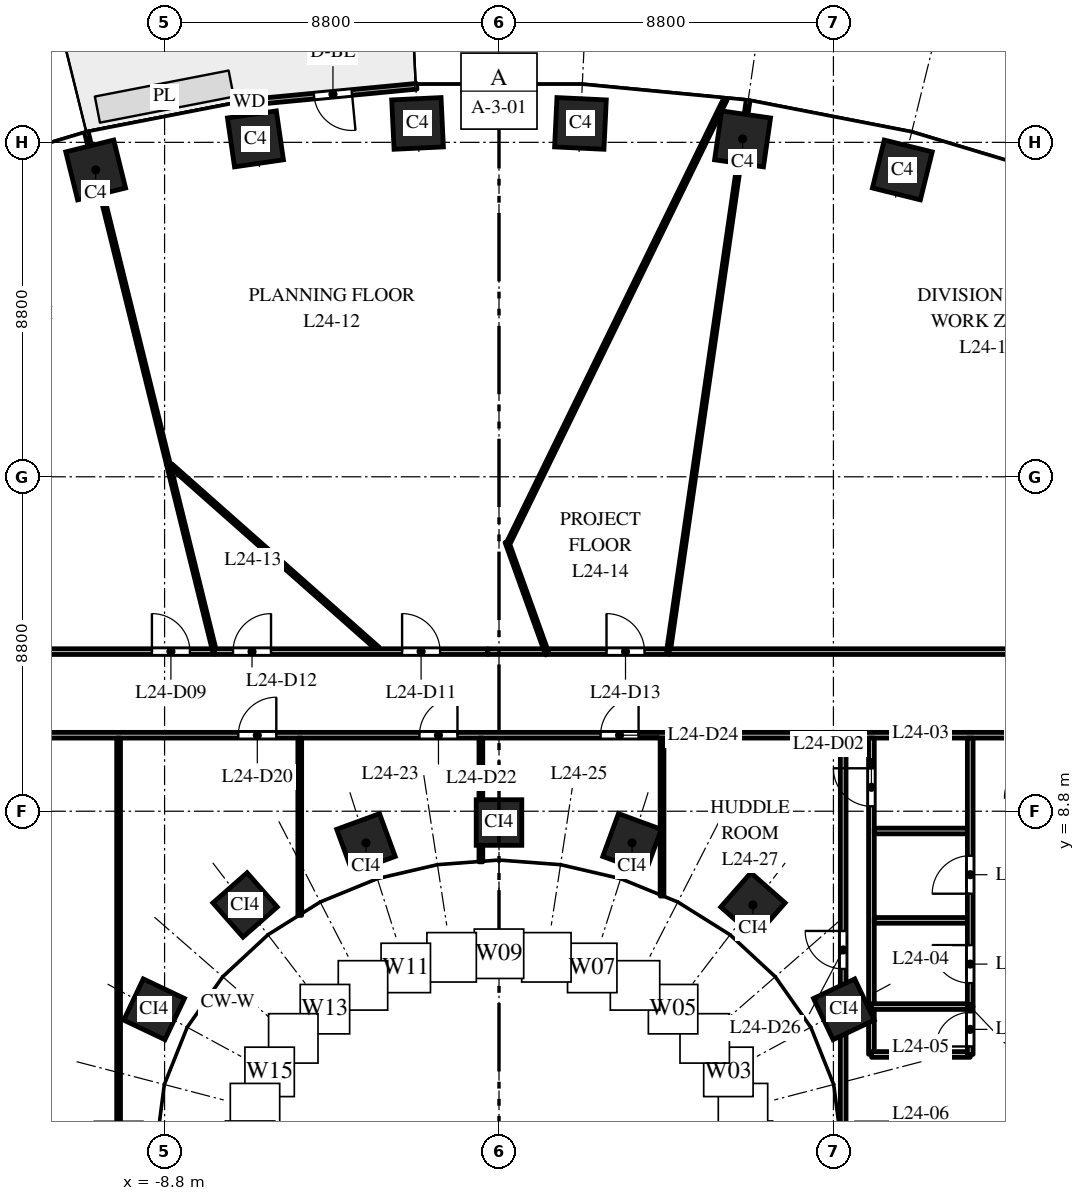
"""IFC4 building model, lengths in metres.
Left out: names, types, materials, properties, quantities, classifications, styles, units other than length and angle.
Written with IfcOpenShell. Run it as: python <this file> out.ifc"""

import sys

from ifc_helpers import new_model, si_unit, direction, frame, frame_2d, origin, origin_2d, place, context, subcontext, project, spatial, rectangle, extrude, element, fill, save


model = new_model("IFC4")
c1 = context("Model", 3, precision=1e-05, world=origin(), true_north=direction((0.0, 1.0)))
c2 = subcontext(c1, "Body", "Model", "MODEL_VIEW")
j1 = project(units=[si_unit("LENGTHUNIT", "METRE"), si_unit("PLANEANGLEUNIT", "RADIAN")], contexts=[c1])
p1 = place(None, origin())
s1 = spatial("IfcSite", under=j1, at=p1, CompositionType="ELEMENT")
p2 = place(p1, origin())
s2 = spatial("IfcBuilding", under=s1, at=p2, CompositionType="ELEMENT")
p3 = place(p2, frame((0.0, 0.0, 108.0)))
s3 = spatial("IfcBuildingStorey", under=s2, at=p3, CompositionType="ELEMENT", Elevation=108.0)
for number, where, z_axis, x_axis in (
    (1, (10.613, 25.674, 0.0), (0.0, 0.0, 1.0), (-0.971, 0.24, 0.0)),
    (2, (6.409, 26.491, 0.0), (0.0, 0.0, 1.0), (-0.99, 0.143, 0.0)),
    (3, (2.143, 26.898, 0.0), (0.0, 0.0, 1.0), (-0.999, 0.048, 0.0)),
    (4, (-2.143, 26.898, 0.0), (0.0, 0.0, 1.0), (-0.999, -0.048, 0.0)),
    (5, (-6.409, 26.491, 0.0), (0.0, 0.0, 1.0), (-0.99, -0.143, 0.0)),
    (6, (-10.613, 25.674, 0.0), (0.0, 0.0, 1.0), (-0.971, -0.24, 0.0)),
):
    element("IfcColumn", number, at=place(p3, frame(where, z_axis=z_axis, x_axis=x_axis)), inside=s3, PredefinedType="COLUMN", context=c2, shape_type="SweptSolid", body=[
        extrude(rectangle(XDim=1.3, YDim=1.3, at=origin_2d()), origin(), (0.0, 0.0, 1.0), 4.0),
    ])
for number, where, z_axis, x_axis in (
    (7, (9.076, 3.588, 0.0), (0.0, 0.0, 1.0), (-0.429, 0.903, 0.0)),
    (8, (6.682, 6.334, 0.0), (0.0, 0.0, 1.0), (-0.751, 0.66, 0.0)),
    (9, (3.501, 7.967, 0.0), (0.0, 0.0, 1.0), (-0.939, 0.344, 0.0)),
    (10, (0.0, 8.503, 0.0), (0.0, 0.0, 1.0), (-1.0, 0.0, 0.0)),
    (11, (-3.501, 7.967, 0.0), (0.0, 0.0, 1.0), (-0.939, -0.344, 0.0)),
    (12, (-6.682, 6.334, 0.0), (0.0, 0.0, 1.0), (-0.751, -0.66, 0.0)),
    (13, (-9.076, 3.588, 0.0), (0.0, 0.0, 1.0), (-0.429, -0.903, 0.0)),
):
    element("IfcColumn", number, at=place(p3, frame(where, z_axis=z_axis, x_axis=x_axis)), inside=s3, PredefinedType="COLUMN", context=c2, shape_type="SweptSolid", body=[
        extrude(rectangle(XDim=1.2, YDim=1.2, at=origin_2d()), origin(), (0.0, 0.0, 1.0), 4.0),
    ])
p4 = place(p3, frame((-2.166, 27.875, 0.0), z_axis=(0.0, 0.0, 1.0), x_axis=(-0.995473879823, -0.095035543824, 0.0)))
e14 = element("IfcWall", 14, at=p4, inside=s3, PredefinedType="STANDARD", context=c2, shape_type="SweptSolid", body=[
    extrude(rectangle(XDim=4.426, YDim=0.15, at=frame_2d((2.213, 0.0))), origin(), (0.0, 0.0, 1.0), 3.7),
])
p5 = place(p4, frame((1.713, 0.0, 0.0)))
e15 = element("IfcOpeningElement", 15, at=p5, cuts=e14, PredefinedType="OPENING", context=c2, shape_type="SweptSolid", body=[
    extrude(rectangle(XDim=1.0, YDim=2.4, at=frame_2d((0.5, 1.2))), frame((0.0, 0.085, 0.0), z_axis=(0.0, -1.0, 0.0), x_axis=(1.0, 0.0, 0.0)), (0.0, 0.0, 1.0), 0.17),
])
p6 = place(p3, frame((-16.5, 13.0, 0.0), z_axis=(0.0, 0.0, 1.0), x_axis=(1.0, 0.0, 0.0)))
e16 = element("IfcWall", 16, at=p6, inside=s3, PredefinedType="PARTITIONING", context=c2, shape_type="SweptSolid", body=[
    extrude(rectangle(XDim=9.001, YDim=0.15, at=frame_2d((4.5, 0.0))), origin(), (0.0, 0.0, 1.0), 2.85),
])
p7 = place(p6, frame((7.367, 0.0, 0.0)))
e17 = element("IfcOpeningElement", 17, at=p7, cuts=e16, PredefinedType="OPENING", context=c2, shape_type="SweptSolid", body=[
    extrude(rectangle(XDim=1.0, YDim=2.1, at=frame_2d((0.5, 1.05))), frame((0.0, 0.085, 0.0), z_axis=(0.0, -1.0, 0.0), x_axis=(1.0, 0.0, 0.0)), (0.0, 0.0, 1.0), 0.17),
])
p8 = place(p3, frame((-14.3, 10.8, 0.0), z_axis=(0.0, 0.0, 1.0), x_axis=(1.0, 0.0, 0.0)))
e18 = element("IfcWall", 18, at=p8, inside=s3, PredefinedType="PARTITIONING", context=c2, shape_type="SweptSolid", body=[
    extrude(rectangle(XDim=28.6, YDim=0.15, at=frame_2d((14.3, 0.0))), origin(), (0.0, 0.0, 1.0), 2.85),
])
p9 = place(p8, frame((7.44, 0.0, 0.0)))
e19 = element("IfcOpeningElement", 19, at=p9, cuts=e18, PredefinedType="OPENING", context=c2, shape_type="SweptSolid", body=[
    extrude(rectangle(XDim=1.0, YDim=2.1, at=frame_2d((0.5, 1.05))), frame((0.0, 0.085, 0.0), z_axis=(0.0, -1.0, 0.0), x_axis=(1.0, 0.0, 0.0)), (0.0, 0.0, 1.0), 0.17),
])
p10 = place(p8, frame((12.207, 0.0, 0.0)))
e20 = element("IfcOpeningElement", 20, at=p10, cuts=e18, PredefinedType="OPENING", context=c2, shape_type="SweptSolid", body=[
    extrude(rectangle(XDim=1.0, YDim=2.1, at=frame_2d((0.5, 1.05))), frame((0.0, 0.085, 0.0), z_axis=(0.0, -1.0, 0.0), x_axis=(1.0, 0.0, 0.0)), (0.0, 0.0, 1.0), 0.17),
])
p11 = place(p8, frame((16.973, 0.0, 0.0)))
e21 = element("IfcOpeningElement", 21, at=p11, cuts=e18, PredefinedType="OPENING", context=c2, shape_type="SweptSolid", body=[
    extrude(rectangle(XDim=1.0, YDim=2.1, at=frame_2d((0.5, 1.05))), frame((0.0, 0.085, 0.0), z_axis=(0.0, -1.0, 0.0), x_axis=(1.0, 0.0, 0.0)), (0.0, 0.0, 1.0), 0.17),
])
p12 = place(p3, frame((-10.853, 26.646, 0.0), z_axis=(0.0, 0.0, 1.0), x_axis=(0.239763745499, -0.97083126564, 0.0)))
e22 = element("IfcWall", 22, at=p12, inside=s3, PredefinedType="PARTITIONING", context=c2, shape_type="SweptSolid", body=[
    extrude(rectangle(XDim=14.056, YDim=0.1, at=frame_2d((7.028, 0.0))), origin(), (0.0, 0.0, 1.0), 2.85),
])
p13 = place(p3, frame((-10.01, -10.725, 0.0), z_axis=(0.0, 0.0, 1.0), x_axis=(0.0, 1.0, 0.0)))
e23 = element("IfcWall", 23, at=p13, inside=s3, PredefinedType="PARTITIONING", context=c2, shape_type="SweptSolid", body=[
    extrude(rectangle(XDim=21.45, YDim=0.1, at=frame_2d((10.725, 0.0))), origin(), (0.0, 0.0, 1.0), 2.75),
])
p14 = place(p3, frame((-8.642, 17.903, 0.0), z_axis=(0.0, 0.0, 1.0), x_axis=(0.749027274438, -0.662539162728, 0.0)))
e24 = element("IfcWall", 24, at=p14, inside=s3, PredefinedType="PARTITIONING", context=c2, shape_type="SweptSolid", body=[
    extrude(rectangle(XDim=7.283, YDim=0.1, at=frame_2d((3.642, 0.0))), origin(), (0.0, 0.0, 1.0), 2.85),
])
p15 = place(p3, frame((-7.483, 13.0, 0.0), z_axis=(0.0, 0.0, 1.0), x_axis=(1.0, 0.0, 0.0)))
e25 = element("IfcWall", 25, at=p15, inside=s3, PredefinedType="PARTITIONING", context=c2, shape_type="SweptSolid", body=[
    extrude(rectangle(XDim=7.184, YDim=0.15, at=frame_2d((3.592, 0.0))), origin(), (0.0, 0.0, 1.0), 2.85),
])
p16 = place(p15, frame((4.933, 0.0, 0.0)))
e26 = element("IfcOpeningElement", 26, at=p16, cuts=e25, PredefinedType="OPENING", context=c2, shape_type="SweptSolid", body=[
    extrude(rectangle(XDim=1.0, YDim=2.1, at=frame_2d((0.5, 1.05))), frame((0.0, 0.085, 0.0), z_axis=(0.0, -1.0, 0.0), x_axis=(1.0, 0.0, 0.0)), (0.0, 0.0, 1.0), 0.17),
])
p17 = place(p15, frame((0.484, 0.0, 0.0)))
e27 = element("IfcOpeningElement", 27, at=p17, cuts=e25, PredefinedType="OPENING", context=c2, shape_type="SweptSolid", body=[
    extrude(rectangle(XDim=1.0, YDim=2.1, at=frame_2d((0.5, 1.05))), frame((0.0, 0.085, 0.0), z_axis=(0.0, -1.0, 0.0), x_axis=(1.0, 0.0, 0.0)), (0.0, 0.0, 1.0), 0.17),
])
p18 = place(p3, frame((-5.243, 6.059, 0.0), z_axis=(0.0, 0.0, 1.0), x_axis=(0.0, 1.0, 0.0)))
e28 = element("IfcWall", 28, at=p18, inside=s3, PredefinedType="PARTITIONING", context=c2, shape_type="SweptSolid", body=[
    extrude(rectangle(XDim=4.666, YDim=0.1, at=frame_2d((2.333, 0.0))), origin(), (0.0, 0.0, 1.0), 2.9),
])
p19 = place(p3, frame((-0.477, 7.468, 0.0), z_axis=(0.0, 0.0, 1.0), x_axis=(0.0, 1.0, 0.0)))
e29 = element("IfcWall", 29, at=p19, inside=s3, PredefinedType="PARTITIONING", context=c2, shape_type="SweptSolid", body=[
    extrude(rectangle(XDim=3.257, YDim=0.1, at=frame_2d((1.628, 0.0))), origin(), (0.0, 0.0, 1.0), 2.9),
])
p20 = place(p3, frame((-0.295, 13.0, 0.0), z_axis=(0.0, 0.0, 1.0), x_axis=(1.0, 0.0, 0.0)))
e30 = element("IfcWall", 30, at=p20, inside=s3, PredefinedType="PARTITIONING", context=c2, shape_type="SweptSolid", body=[
    extrude(rectangle(XDim=1.529, YDim=0.15, at=frame_2d((0.764, 0.0))), origin(), (0.0, 0.0, 1.0), 3.7),
])
p21 = place(p3, frame((0.207, 15.89, 0.0), z_axis=(0.0, 0.0, 1.0), x_axis=(0.338439213009, -0.94098825662, 0.0)))
e31 = element("IfcWall", 31, at=p21, inside=s3, PredefinedType="PARTITIONING", context=c2, shape_type="SweptSolid", body=[
    extrude(rectangle(XDim=3.147, YDim=0.1, at=frame_2d((1.573, 0.0))), origin(), (0.0, 0.0, 1.0), 3.7),
])
p22 = place(p3, frame((0.262, 15.887, 0.0), z_axis=(0.0, 0.0, 1.0), x_axis=(0.439206418019, 0.898386176636, 0.0)))
e32 = element("IfcWall", 32, at=p22, inside=s3, PredefinedType="PARTITIONING", context=c2, shape_type="SweptSolid", body=[
    extrude(rectangle(XDim=12.969, YDim=0.1, at=frame_2d((6.484, 0.0))), origin(), (0.0, 0.0, 1.0), 2.9),
])
p23 = place(p3, frame((1.299, 13.0, 0.0), z_axis=(0.0, 0.0, 1.0), x_axis=(1.0, 0.0, 0.0)))
e33 = element("IfcWall", 33, at=p23, inside=s3, PredefinedType="PARTITIONING", context=c2, shape_type="SweptSolid", body=[
    extrude(rectangle(XDim=3.16, YDim=0.15, at=frame_2d((1.58, 0.0))), origin(), (0.0, 0.0, 1.0), 2.85),
])
p24 = place(p23, frame((1.53, 0.0, 0.0)))
e34 = element("IfcOpeningElement", 34, at=p24, cuts=e33, PredefinedType="OPENING", context=c2, shape_type="SweptSolid", body=[
    extrude(rectangle(XDim=1.0, YDim=2.1, at=frame_2d((0.5, 1.05))), frame((0.0, 0.085, 0.0), z_axis=(0.0, -1.0, 0.0), x_axis=(1.0, 0.0, 0.0)), (0.0, 0.0, 1.0), 0.17),
])
p25 = place(p3, frame((4.29, 6.568, 0.0), z_axis=(0.0, 0.0, 1.0), x_axis=(0.0, 1.0, 0.0)))
e35 = element("IfcWall", 35, at=p25, inside=s3, PredefinedType="PARTITIONING", context=c2, shape_type="SweptSolid", body=[
    extrude(rectangle(XDim=4.157, YDim=0.1, at=frame_2d((2.079, 0.0))), origin(), (0.0, 0.0, 1.0), 2.9),
])
p26 = place(p3, frame((4.459, 13.004, 0.0), z_axis=(0.0, 0.0, 1.0), x_axis=(0.143087196312, 0.98971008596, 0.0)))
e36 = element("IfcWall", 36, at=p26, inside=s3, PredefinedType="PARTITIONING", context=c2, shape_type="SweptSolid", body=[
    extrude(rectangle(XDim=14.628, YDim=0.1, at=frame_2d((7.314, 0.0))), origin(), (0.0, 0.0, 1.0), 2.85),
])
p27 = place(p3, frame((4.479, 13.0, 0.0), z_axis=(0.0, 0.0, 1.0), x_axis=(1.0, 0.0, 0.0)))
e37 = element("IfcWall", 37, at=p27, inside=s3, PredefinedType="PARTITIONING", context=c2, shape_type="SweptSolid", body=[
    extrude(rectangle(XDim=12.021, YDim=0.15, at=frame_2d((6.01, 0.0))), origin(), (0.0, 0.0, 1.0), 2.85),
])
p28 = place(p27, frame((10.371, 0.0, 0.0)))
e38 = element("IfcOpeningElement", 38, at=p28, cuts=e37, PredefinedType="OPENING", context=c2, shape_type="SweptSolid", body=[
    extrude(rectangle(XDim=1.0, YDim=2.1, at=frame_2d((0.5, 1.05))), frame((0.0, 0.085, 0.0), z_axis=(0.0, -1.0, 0.0), x_axis=(1.0, 0.0, 0.0)), (0.0, 0.0, 1.0), 0.17),
])
p29 = place(p3, frame((9.057, 0.045, 0.0), z_axis=(0.0, 0.0, 1.0), x_axis=(0.0, 1.0, 0.0)))
e39 = element("IfcWall", 39, at=p29, inside=s3, PredefinedType="PARTITIONING", context=c2, shape_type="SweptSolid", body=[
    extrude(rectangle(XDim=10.68, YDim=0.15, at=frame_2d((5.34, 0.0))), origin(), (0.0, 0.0, 1.0), 2.75),
])
p30 = place(p29, frame((4.605, 0.0, 0.0)))
e40 = element("IfcOpeningElement", 40, at=p30, cuts=e39, PredefinedType="OPENING", context=c2, shape_type="SweptSolid", body=[
    extrude(rectangle(XDim=1.0, YDim=2.1, at=frame_2d((0.5, 1.05))), frame((0.0, 0.085, 0.0), z_axis=(0.0, -1.0, 0.0), x_axis=(1.0, 0.0, 0.0)), (0.0, 0.0, 1.0), 0.17),
])
p31 = place(p3, frame((9.8, 2.404, 0.0), z_axis=(0.0, 0.0, 1.0), x_axis=(0.0, 1.0, 0.0)))
e41 = element("IfcWall", 41, at=p31, inside=s3, PredefinedType="PARTITIONING", context=c2, shape_type="SweptSolid", body=[
    extrude(rectangle(XDim=1.256, YDim=0.15, at=frame_2d((0.628, 0.0))), origin(), (0.0, 0.0, 1.0), 3.7),
])
p32 = place(p3, frame((9.8, 3.66, 0.0), z_axis=(0.0, 0.0, 1.0), x_axis=(0.0, 1.0, 0.0)))
e42 = element("IfcWall", 42, at=p32, inside=s3, PredefinedType="PARTITIONING", context=c2, shape_type="SweptSolid", body=[
    extrude(rectangle(XDim=7.065, YDim=0.15, at=frame_2d((3.533, 0.0))), origin(), (0.0, 0.0, 1.0), 2.75),
])
p33 = place(p32, frame((5.27, 0.0, 0.0)))
e43 = element("IfcOpeningElement", 43, at=p33, cuts=e42, PredefinedType="OPENING", context=c2, shape_type="SweptSolid", body=[
    extrude(rectangle(XDim=1.0, YDim=2.1, at=frame_2d((0.5, 1.05))), frame((0.0, 0.085, 0.0), z_axis=(0.0, -1.0, 0.0), x_axis=(1.0, 0.0, 0.0)), (0.0, 0.0, 1.0), 0.17),
])
p34 = place(p3, frame((9.8, 3.66, 0.0), z_axis=(0.0, 0.0, 1.0), x_axis=(1.0, 0.0, 0.0)))
e44 = element("IfcWall", 44, at=p34, inside=s3, PredefinedType="PARTITIONING", context=c2, shape_type="SweptSolid", body=[
    extrude(rectangle(XDim=2.6, YDim=0.15, at=frame_2d((1.3, 0.0))), origin(), (0.0, 0.0, 1.0), 3.7),
])
p35 = place(p3, frame((9.875, 5.928, 0.0), z_axis=(0.0, 0.0, 1.0), x_axis=(1.0, 0.0, 0.0)))
e45 = element("IfcWall", 45, at=p35, inside=s3, PredefinedType="PARTITIONING", context=c2, shape_type="SweptSolid", body=[
    extrude(rectangle(XDim=2.45, YDim=0.15, at=frame_2d((1.225, 0.0))), origin(), (0.0, 0.0, 1.0), 2.75),
])
p36 = place(p3, frame((9.875, 8.28, 0.0), z_axis=(0.0, 0.0, 1.0), x_axis=(1.0, 0.0, 0.0)))
e46 = element("IfcWall", 46, at=p36, inside=s3, PredefinedType="PARTITIONING", context=c2, shape_type="SweptSolid", body=[
    extrude(rectangle(XDim=2.45, YDim=0.15, at=frame_2d((1.225, 0.0))), origin(), (0.0, 0.0, 1.0), 3.7),
])
p37 = place(p3, frame((9.804, 2.4, 0.0), z_axis=(0.0, 0.0, 1.0), x_axis=(1.0, 0.0, 0.0)))
e47 = element("IfcWall", 47, at=p37, inside=s3, PredefinedType="PARTITIONING", context=c2, shape_type="SweptSolid", body=[
    extrude(rectangle(XDim=2.596, YDim=0.15, at=frame_2d((1.298, 0.0))), origin(), (0.0, 0.0, 1.0), 3.7),
])
p38 = place(p3, frame((12.4, 2.4, 0.0), z_axis=(0.0, 0.0, 1.0), x_axis=(0.0, 1.0, 0.0)))
e48 = element("IfcWall", 48, at=p38, inside=s3, PredefinedType="PARTITIONING", context=c2, shape_type="SweptSolid", body=[
    extrude(rectangle(XDim=1.26, YDim=0.15, at=frame_2d((0.63, 0.0))), origin(), (0.0, 0.0, 1.0), 3.7),
])
p39 = place(p38, frame((0.21, 0.0, 0.0)))
e49 = element("IfcOpeningElement", 49, at=p39, cuts=e48, PredefinedType="OPENING", context=c2, shape_type="SweptSolid", body=[
    extrude(rectangle(XDim=0.9, YDim=2.1, at=frame_2d((0.45, 1.05))), frame((0.0, 0.085, 0.0), z_axis=(0.0, -1.0, 0.0), x_axis=(1.0, 0.0, 0.0)), (0.0, 0.0, 1.0), 0.17),
])
p40 = place(p3, frame((12.4, 3.66, 0.0), z_axis=(0.0, 0.0, 1.0), x_axis=(0.0, 1.0, 0.0)))
e50 = element("IfcWall", 50, at=p40, inside=s3, PredefinedType="PARTITIONING", context=c2, shape_type="SweptSolid", body=[
    extrude(rectangle(XDim=7.065, YDim=0.15, at=frame_2d((3.533, 0.0))), origin(), (0.0, 0.0, 1.0), 2.75),
])
p41 = place(p40, frame((2.97, 0.0, 0.0)))
e51 = element("IfcOpeningElement", 51, at=p41, cuts=e50, PredefinedType="OPENING", context=c2, shape_type="SweptSolid", body=[
    extrude(rectangle(XDim=1.0, YDim=2.1, at=frame_2d((0.5, 1.05))), frame((0.0, 0.085, 0.0), z_axis=(0.0, -1.0, 0.0), x_axis=(1.0, 0.0, 0.0)), (0.0, 0.0, 1.0), 0.17),
])
p42 = place(p40, frame((0.618, 0.0, 0.0)))
e52 = element("IfcOpeningElement", 52, at=p42, cuts=e50, PredefinedType="OPENING", context=c2, shape_type="SweptSolid", body=[
    extrude(rectangle(XDim=1.0, YDim=2.1, at=frame_2d((0.5, 1.05))), frame((0.0, 0.085, 0.0), z_axis=(0.0, -1.0, 0.0), x_axis=(1.0, 0.0, 0.0)), (0.0, 0.0, 1.0), 0.17),
])
p43 = place(p5, origin())
e53 = element("IfcDoor", 53, at=p43, inside=s3, OperationType="SINGLE_SWING_LEFT", PredefinedType="DOOR", context=c2, shape_type="SweptSolid", body=[
    extrude(rectangle(XDim=1.0, YDim=2.4, at=frame_2d((0.5, 1.2))), frame((0.0, 0.025, 0.0), z_axis=(0.0, -1.0, 0.0), x_axis=(1.0, 0.0, 0.0)), (0.0, 0.0, 1.0), 0.05),
])
fill(e15, e53)
p44 = place(p33, origin())
e54 = element("IfcDoor", 54, at=p44, inside=s3, OperationType="SINGLE_SWING_RIGHT", PredefinedType="DOOR", context=c2, shape_type="SweptSolid", body=[
    extrude(rectangle(XDim=1.0, YDim=2.1, at=frame_2d((0.5, 1.05))), frame((0.0, 0.025, 0.0), z_axis=(0.0, -1.0, 0.0), x_axis=(1.0, 0.0, 0.0)), (0.0, 0.0, 1.0), 0.05),
])
fill(e43, e54)
p45 = place(p41, origin())
e55 = element("IfcDoor", 55, at=p45, inside=s3, OperationType="SINGLE_SWING_LEFT", PredefinedType="DOOR", context=c2, shape_type="SweptSolid", body=[
    extrude(rectangle(XDim=1.0, YDim=2.1, at=frame_2d((0.5, 1.05))), frame((0.0, 0.025, 0.0), z_axis=(0.0, -1.0, 0.0), x_axis=(1.0, 0.0, 0.0)), (0.0, 0.0, 1.0), 0.05),
])
fill(e51, e55)
p46 = place(p42, origin())
e56 = element("IfcDoor", 56, at=p46, inside=s3, OperationType="SINGLE_SWING_RIGHT", PredefinedType="DOOR", context=c2, shape_type="SweptSolid", body=[
    extrude(rectangle(XDim=1.0, YDim=2.1, at=frame_2d((0.5, 1.05))), frame((0.0, 0.025, 0.0), z_axis=(0.0, -1.0, 0.0), x_axis=(1.0, 0.0, 0.0)), (0.0, 0.0, 1.0), 0.05),
])
fill(e52, e56)
p47 = place(p39, origin())
e57 = element("IfcDoor", 57, at=p47, inside=s3, OperationType="SINGLE_SWING_LEFT", PredefinedType="DOOR", context=c2, shape_type="SweptSolid", body=[
    extrude(rectangle(XDim=0.9, YDim=2.1, at=frame_2d((0.45, 1.05))), frame((0.0, 0.025, 0.0), z_axis=(0.0, -1.0, 0.0), x_axis=(1.0, 0.0, 0.0)), (0.0, 0.0, 1.0), 0.05),
])
fill(e49, e57)
p48 = place(p7, origin())
e58 = element("IfcDoor", 58, at=p48, inside=s3, OperationType="SINGLE_SWING_LEFT", PredefinedType="DOOR", context=c2, shape_type="SweptSolid", body=[
    extrude(rectangle(XDim=1.0, YDim=2.1, at=frame_2d((0.5, 1.05))), frame((0.0, 0.025, 0.0), z_axis=(0.0, -1.0, 0.0), x_axis=(1.0, 0.0, 0.0)), (0.0, 0.0, 1.0), 0.05),
])
fill(e17, e58)
p49 = place(p16, origin())
e59 = element("IfcDoor", 59, at=p49, inside=s3, OperationType="SINGLE_SWING_LEFT", PredefinedType="DOOR", context=c2, shape_type="SweptSolid", body=[
    extrude(rectangle(XDim=1.0, YDim=2.1, at=frame_2d((0.5, 1.05))), frame((0.0, 0.025, 0.0), z_axis=(0.0, -1.0, 0.0), x_axis=(1.0, 0.0, 0.0)), (0.0, 0.0, 1.0), 0.05),
])
fill(e26, e59)
p50 = place(p17, origin())
e60 = element("IfcDoor", 60, at=p50, inside=s3, OperationType="SINGLE_SWING_RIGHT", PredefinedType="DOOR", context=c2, shape_type="SweptSolid", body=[
    extrude(rectangle(XDim=1.0, YDim=2.1, at=frame_2d((0.5, 1.05))), frame((0.0, 0.025, 0.0), z_axis=(0.0, -1.0, 0.0), x_axis=(1.0, 0.0, 0.0)), (0.0, 0.0, 1.0), 0.05),
])
fill(e27, e60)
p51 = place(p24, origin())
e61 = element("IfcDoor", 61, at=p51, inside=s3, OperationType="SINGLE_SWING_LEFT", PredefinedType="DOOR", context=c2, shape_type="SweptSolid", body=[
    extrude(rectangle(XDim=1.0, YDim=2.1, at=frame_2d((0.5, 1.05))), frame((0.0, 0.025, 0.0), z_axis=(0.0, -1.0, 0.0), x_axis=(1.0, 0.0, 0.0)), (0.0, 0.0, 1.0), 0.05),
])
fill(e34, e61)
p52 = place(p9, origin())
e62 = element("IfcDoor", 62, at=p52, inside=s3, OperationType="SINGLE_SWING_RIGHT", PredefinedType="DOOR", context=c2, shape_type="SweptSolid", body=[
    extrude(rectangle(XDim=1.0, YDim=2.1, at=frame_2d((0.5, 1.05))), frame((0.0, 0.025, 0.0), z_axis=(0.0, -1.0, 0.0), x_axis=(1.0, 0.0, 0.0)), (0.0, 0.0, 1.0), 0.05),
])
fill(e19, e62)
p53 = place(p10, origin())
e63 = element("IfcDoor", 63, at=p53, inside=s3, OperationType="SINGLE_SWING_RIGHT", PredefinedType="DOOR", context=c2, shape_type="SweptSolid", body=[
    extrude(rectangle(XDim=1.0, YDim=2.1, at=frame_2d((0.5, 1.05))), frame((0.0, 0.025, 0.0), z_axis=(0.0, -1.0, 0.0), x_axis=(1.0, 0.0, 0.0)), (0.0, 0.0, 1.0), 0.05),
])
fill(e20, e63)
p54 = place(p11, origin())
e64 = element("IfcDoor", 64, at=p54, inside=s3, OperationType="SINGLE_SWING_RIGHT", PredefinedType="DOOR", context=c2, shape_type="SweptSolid", body=[
    extrude(rectangle(XDim=1.0, YDim=2.1, at=frame_2d((0.5, 1.05))), frame((0.0, 0.025, 0.0), z_axis=(0.0, -1.0, 0.0), x_axis=(1.0, 0.0, 0.0)), (0.0, 0.0, 1.0), 0.05),
])
fill(e21, e64)
p55 = place(p30, origin())
e65 = element("IfcDoor", 65, at=p55, inside=s3, OperationType="SINGLE_SWING_RIGHT", PredefinedType="DOOR", context=c2, shape_type="SweptSolid", body=[
    extrude(rectangle(XDim=1.0, YDim=2.1, at=frame_2d((0.5, 1.05))), frame((0.0, 0.025, 0.0), z_axis=(0.0, -1.0, 0.0), x_axis=(1.0, 0.0, 0.0)), (0.0, 0.0, 1.0), 0.05),
])
fill(e40, e65)
save(model, sys.argv[1])
